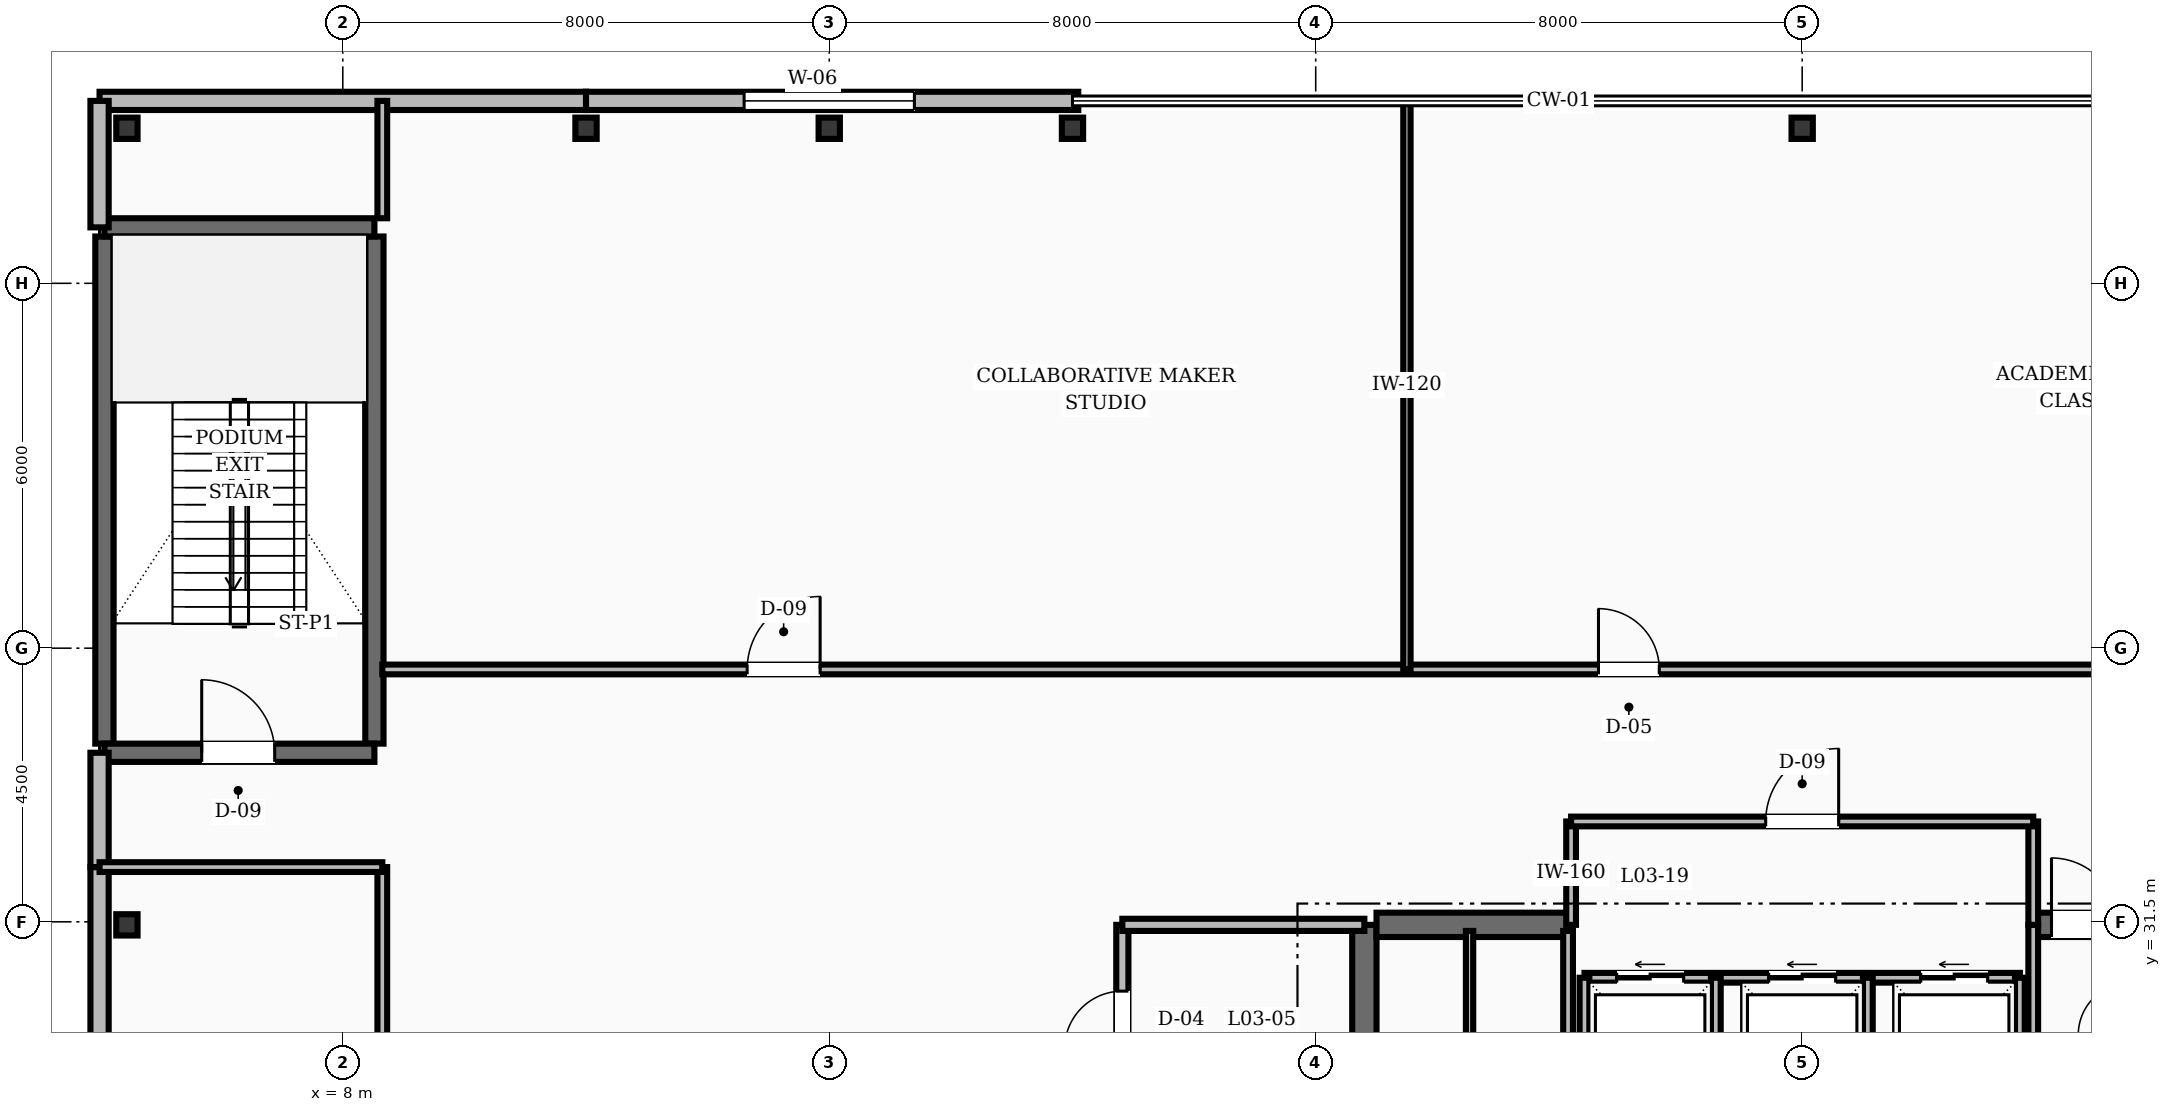
"""IFC4 building model, lengths in metres.
Left out: names, types, materials, properties, quantities, classifications, styles, units other than length and angle.
Written with IfcOpenShell. Run it as: python <this file> out.ifc"""

import sys

from ifc_helpers import new_model, si_unit, direction, frame, frame_2d, origin, origin_2d, place, context, subcontext, project, spatial, rectangle, hollow_rectangle, i_section, extrude, element, fill, save


model = new_model("IFC4")
c1 = context("Model", 3, precision=1e-05, world=origin(), true_north=direction((0.0, 1.0)))
c2 = subcontext(c1, "Body", "Model", "MODEL_VIEW")
j1 = project(units=[si_unit("LENGTHUNIT", "METRE"), si_unit("PLANEANGLEUNIT", "RADIAN")], contexts=[c1])
p1 = place(None, origin())
s1 = spatial("IfcSite", under=j1, at=p1, CompositionType="ELEMENT")
p2 = place(p1, origin())
s2 = spatial("IfcBuilding", under=s1, at=p2, CompositionType="ELEMENT")
p3 = place(p2, frame((0.0, 0.0, 14.8)))
s3 = spatial("IfcBuildingStorey", under=s2, at=p3, CompositionType="ELEMENT", Elevation=14.8)
p4 = place(p3, frame((24.8, 25.15, 0.0), z_axis=(0.0, 0.0, 1.0), x_axis=(0.0, 1.0, 0.0)))
e1 = element("IfcWall", 1, at=p4, inside=s3, PredefinedType="SHEAR", context=c2, shape_type="SweptSolid", body=[
    extrude(rectangle(XDim=6.3, YDim=0.4, at=frame_2d((3.15, 0.0))), origin(), (0.0, 0.0, 1.0), 4.8),
])
p5 = place(p3, frame((25.0, 31.45, 0.0), z_axis=(0.0, 0.0, 1.0), x_axis=(1.0, 0.0, 0.0)))
e2 = element("IfcWall", 2, at=p5, inside=s3, PredefinedType="SHEAR", context=c2, shape_type="SweptSolid", body=[
    extrude(rectangle(XDim=3.2, YDim=0.4, at=frame_2d((1.6, 0.0))), origin(), (0.0, 0.0, 1.0), 4.8),
])
p6 = place(p3, frame((35.8, 31.45, 0.0), z_axis=(0.0, 0.0, 1.0), x_axis=(1.0, 0.0, 0.0)))
e3 = element("IfcWall", 3, at=p6, inside=s3, PredefinedType="SHEAR", context=c2, shape_type="SweptSolid", body=[
    extrude(rectangle(XDim=3.2, YDim=0.4, at=frame_2d((1.6, 0.0))), origin(), (0.0, 0.0, 1.0), 4.8),
])
p7 = place(p6, frame((0.3, 0.0, 0.0)))
e4 = element("IfcOpeningElement", 4, at=p7, cuts=e3, PredefinedType="OPENING", context=c2, shape_type="SweptSolid", body=[
    extrude(rectangle(XDim=1.1, YDim=2.1, at=frame_2d((0.55, 1.05))), frame((0.0, 0.21, 0.0), z_axis=(0.0, -1.0, 0.0), x_axis=(1.0, 0.0, 0.0)), (0.0, 0.0, 1.0), 0.42),
])
for number, where, z_axis, x_axis in (
    (5, (4.08, 34.43, 0.0), (0.0, 0.0, 1.0), (0.0, 1.0, 0.0)),
    (6, (8.52, 34.43, 0.0), (0.0, 0.0, 1.0), (0.0, 1.0, 0.0)),
):
    element("IfcWall", number, at=place(p3, frame(where, z_axis=z_axis, x_axis=x_axis)), inside=s3, PredefinedType="SHEAR", context=c2, shape_type="SweptSolid", body=[
        extrude(rectangle(XDim=8.34, YDim=0.3, at=frame_2d((4.17, 0.0))), origin(), (0.0, 0.0, 1.0), 4.8),
    ])
p8 = place(p3, frame((4.08, 34.28, 0.0), z_axis=(0.0, 0.0, 1.0), x_axis=(1.0, 0.0, 0.0)))
e7 = element("IfcWall", 7, at=p8, inside=s3, PredefinedType="SHEAR", context=c2, shape_type="SweptSolid", body=[
    extrude(rectangle(XDim=4.44, YDim=0.3, at=frame_2d((2.22, 0.0))), origin(), (0.0, 0.0, 1.0), 4.8),
])
p9 = place(p8, frame((1.6, 0.0, 0.0)))
e8 = element("IfcOpeningElement", 8, at=p9, cuts=e7, PredefinedType="OPENING", context=c2, shape_type="SweptSolid", body=[
    extrude(rectangle(XDim=1.2, YDim=2.1, at=frame_2d((0.6, 1.05))), frame((0.0, 0.16, 0.0), z_axis=(0.0, -1.0, 0.0), x_axis=(1.0, 0.0, 0.0)), (0.0, 0.0, 1.0), 0.32),
])
p10 = place(p3, frame((4.08, 42.92, 0.0), z_axis=(0.0, 0.0, 1.0), x_axis=(1.0, 0.0, 0.0)))
e9 = element("IfcWall", 9, at=p10, inside=s3, PredefinedType="SHEAR", context=c2, shape_type="SweptSolid", body=[
    extrude(rectangle(XDim=4.44, YDim=0.3, at=frame_2d((2.22, 0.0))), origin(), (0.0, 0.0, 1.0), 4.8),
])
for number, where, z_axis, x_axis in (
    (10, (4.45, 44.55, 0.0), (0.0, 0.0, 1.0), (1.0, 0.0, 0.0)),
    (11, (12.0, 44.55, 0.0), (0.0, 0.0, 1.0), (1.0, 0.0, 0.0)),
    (12, (20.0, 44.55, 0.0), (0.0, 0.0, 1.0), (1.0, 0.0, 0.0)),
    (13, (32.0, 44.55, 0.0), (0.0, 0.0, 1.0), (1.0, 0.0, 0.0)),
    (14, (4.45, 31.45, 0.0), (0.0, 0.0, 1.0), (1.0, 0.0, 0.0)),
):
    element("IfcColumn", number, at=place(p3, frame(where, z_axis=z_axis, x_axis=x_axis)), inside=s3, PredefinedType="COLUMN", context=c2, shape_type="SweptSolid", body=[
        extrude(i_section(OverallWidth=0.35, OverallDepth=0.35, WebThickness=0.012, FlangeThickness=0.019, FilletRadius=0.016, at=origin_2d()), origin(), (0.0, 0.0, 1.0), 4.8),
    ])
p11 = place(p3, frame((16.0, 44.55, 0.0), z_axis=(0.0, 0.0, 1.0), x_axis=(1.0, 0.0, 0.0)))
e15 = element("IfcColumn", 15, at=p11, inside=s3, PredefinedType="PILASTER", context=c2, shape_type="SweptSolid", body=[
    extrude(hollow_rectangle(XDim=0.35, YDim=0.35, WallThickness=0.016, at=origin_2d()), origin(), (0.0, 0.0, 1.0), 4.8),
])
p12 = place(p3, frame((12.0, 45.0, 0.0), z_axis=(0.0, 0.0, 1.0), x_axis=(-1.0, 0.0, 0.0)))
e16 = element("IfcWall", 16, at=p12, inside=s3, PredefinedType="STANDARD", context=c2, shape_type="SweptSolid", body=[
    extrude(rectangle(XDim=8.0, YDim=0.3, at=frame_2d((4.0, 0.0))), origin(), (0.0, 0.0, 1.0), 3.57),
])
p13 = place(p3, frame((20.095, 45.0, 0.0), z_axis=(0.0, 0.0, 1.0), x_axis=(-1.0, 0.0, 0.0)))
e17 = element("IfcWall", 17, at=p13, inside=s3, PredefinedType="STANDARD", context=c2, shape_type="SweptSolid", body=[
    extrude(rectangle(XDim=8.095, YDim=0.3, at=frame_2d((4.047, 0.0))), origin(), (0.0, 0.0, 1.0), 3.57),
])
p14 = place(p13, frame((2.695, 0.0, 0.85)))
e18 = element("IfcOpeningElement", 18, at=p14, cuts=e17, PredefinedType="OPENING", context=c2, shape_type="SweptSolid", body=[
    extrude(rectangle(XDim=2.8, YDim=2.3, at=frame_2d((1.4, 1.15))), frame((0.0, 0.16, 0.0), z_axis=(0.0, -1.0, 0.0), x_axis=(1.0, 0.0, 0.0)), (0.0, 0.0, 1.0), 0.32),
])
p15 = place(p3, frame((4.0, 32.4, 0.0), z_axis=(0.0, 0.0, 1.0), x_axis=(0.0, -1.0, 0.0)))
e19 = element("IfcWall", 19, at=p15, inside=s3, PredefinedType="STANDARD", context=c2, shape_type="SweptSolid", body=[
    extrude(rectangle(XDim=10.4, YDim=0.3, at=frame_2d((5.2, 0.0))), origin(), (0.0, 0.0, 1.0), 3.57),
])
p16 = place(p15, frame((3.8, 0.0, 0.85)))
e20 = element("IfcOpeningElement", 20, at=p16, cuts=e19, PredefinedType="OPENING", context=c2, shape_type="SweptSolid", body=[
    extrude(rectangle(XDim=2.8, YDim=2.3, at=frame_2d((1.4, 1.15))), frame((0.0, 0.16, 0.0), z_axis=(0.0, -1.0, 0.0), x_axis=(1.0, 0.0, 0.0)), (0.0, 0.0, 1.0), 0.32),
])
p17 = place(p3, frame((4.0, 34.28, 0.0), z_axis=(0.0, 0.0, 1.0), x_axis=(0.0, -1.0, 0.0)))
e21 = element("IfcWall", 21, at=p17, inside=s3, PredefinedType="STANDARD", context=c2, shape_type="SweptSolid", body=[
    extrude(rectangle(XDim=1.88, YDim=0.3, at=frame_2d((0.94, 0.0))), origin(), (0.0, 0.0, 1.0), 3.57),
])
p18 = place(p3, frame((4.0, 45.0, 0.0), z_axis=(0.0, 0.0, 1.0), x_axis=(0.0, -1.0, 0.0)))
e22 = element("IfcWall", 22, at=p18, inside=s3, PredefinedType="STANDARD", context=c2, shape_type="SweptSolid", body=[
    extrude(rectangle(XDim=2.08, YDim=0.3, at=frame_2d((1.04, 0.0))), origin(), (0.0, 0.0, 1.0), 3.57),
])
p19 = place(p3, frame((20.82, 28.32, 0.0), z_axis=(0.0, 0.0, 1.0), x_axis=(0.0, 1.0, 0.0)))
e23 = element("IfcWall", 23, at=p19, inside=s3, PredefinedType="SOLIDWALL", context=c2, shape_type="SweptSolid", body=[
    extrude(rectangle(XDim=3.13, YDim=0.2, at=frame_2d((1.565, 0.0))), origin(), (0.0, 0.0, 1.0), 3.52),
])
p20 = place(p19, frame((1.09, 0.0, 0.0)))
e24 = element("IfcOpeningElement", 24, at=p20, cuts=e23, PredefinedType="OPENING", context=c2, shape_type="SweptSolid", body=[
    extrude(rectangle(XDim=0.95, YDim=2.1, at=frame_2d((0.475, 1.05))), frame((0.0, 0.11, 0.0), z_axis=(0.0, -1.0, 0.0), x_axis=(1.0, 0.0, 0.0)), (0.0, 0.0, 1.0), 0.22),
])
p21 = place(p3, frame((20.82, 31.45, 0.0), z_axis=(0.0, 0.0, 1.0), x_axis=(1.0, 0.0, 0.0)))
e25 = element("IfcWall", 25, at=p21, inside=s3, PredefinedType="SOLIDWALL", context=c2, shape_type="SweptSolid", body=[
    extrude(rectangle(XDim=3.98, YDim=0.2, at=frame_2d((1.99, 0.0))), origin(), (0.0, 0.0, 1.0), 3.52),
])
p22 = place(p3, frame((35.8, 25.25, 0.0), z_axis=(0.0, 0.0, 1.0), x_axis=(0.0, 1.0, 0.0)))
e26 = element("IfcWall", 26, at=p22, inside=s3, PredefinedType="SOLIDWALL", context=c2, shape_type="SweptSolid", body=[
    extrude(rectangle(XDim=6.2, YDim=0.16, at=frame_2d((3.1, 0.0))), origin(), (0.0, 0.0, 1.0), 3.52),
])
p23 = place(p3, frame((28.42, 30.58, 0.0), z_axis=(0.0, 0.0, 1.0), x_axis=(1.0, 0.0, 0.0)))
e27 = element("IfcWall", 27, at=p23, inside=s3, PredefinedType="SOLIDWALL", context=c2, shape_type="SweptSolid", body=[
    extrude(rectangle(XDim=7.16, YDim=0.16, at=frame_2d((3.58, 0.0))), origin(), (0.0, 0.0, 1.0), 3.52),
])
p24 = place(p23, frame((0.53, 0.0, 0.0)))
e28 = element("IfcOpeningElement", 28, at=p24, cuts=e27, PredefinedType="OPENING", context=c2, shape_type="SweptSolid", body=[
    extrude(rectangle(XDim=1.1, YDim=2.15, at=frame_2d((0.55, 1.075))), frame((0.0, 0.09, 0.0), z_axis=(0.0, -1.0, 0.0), x_axis=(1.0, 0.0, 0.0)), (0.0, 0.0, 1.0), 0.18),
])
p25 = place(p23, frame((3.03, 0.0, 0.0)))
e29 = element("IfcOpeningElement", 29, at=p25, cuts=e27, PredefinedType="OPENING", context=c2, shape_type="SweptSolid", body=[
    extrude(rectangle(XDim=1.1, YDim=2.15, at=frame_2d((0.55, 1.075))), frame((0.0, 0.09, 0.0), z_axis=(0.0, -1.0, 0.0), x_axis=(1.0, 0.0, 0.0)), (0.0, 0.0, 1.0), 0.18),
])
p26 = place(p23, frame((5.53, 0.0, 0.0)))
e30 = element("IfcOpeningElement", 30, at=p26, cuts=e27, PredefinedType="OPENING", context=c2, shape_type="SweptSolid", body=[
    extrude(rectangle(XDim=1.1, YDim=2.15, at=frame_2d((0.55, 1.075))), frame((0.0, 0.09, 0.0), z_axis=(0.0, -1.0, 0.0), x_axis=(1.0, 0.0, 0.0)), (0.0, 0.0, 1.0), 0.18),
])
for number, where, z_axis, x_axis in (
    (31, (28.42, 28.42, 0.0), (0.0, 0.0, 1.0), (0.0, 1.0, 0.0)),
    (32, (30.58, 28.42, 0.0), (0.0, 0.0, 1.0), (0.0, 1.0, 0.0)),
    (33, (33.08, 28.42, 0.0), (0.0, 0.0, 1.0), (0.0, 1.0, 0.0)),
    (34, (35.58, 28.42, 0.0), (0.0, 0.0, 1.0), (0.0, 1.0, 0.0)),
):
    element("IfcWall", number, at=place(p3, frame(where, z_axis=z_axis, x_axis=x_axis)), inside=s3, PredefinedType="SOLIDWALL", context=c2, shape_type="SweptSolid", body=[
        extrude(rectangle(XDim=2.16, YDim=0.16, at=frame_2d((1.08, 0.0))), origin(), (0.0, 0.0, 1.0), 3.52),
    ])
for number, where, z_axis, x_axis in (
    (35, (28.2, 31.45, 0.0), (0.0, 0.0, 1.0), (0.0, 1.0, 0.0)),
    (36, (35.8, 31.45, 0.0), (0.0, 0.0, 1.0), (0.0, 1.0, 0.0)),
):
    element("IfcWall", number, at=place(p3, frame(where, z_axis=z_axis, x_axis=x_axis)), inside=s3, PredefinedType="SOLIDWALL", context=c2, shape_type="SweptSolid", body=[
        extrude(rectangle(XDim=1.7, YDim=0.16, at=frame_2d((0.85, 0.0))), origin(), (0.0, 0.0, 1.0), 3.52),
    ])
p27 = place(p3, frame((28.2, 33.15, 0.0), z_axis=(0.0, 0.0, 1.0), x_axis=(1.0, 0.0, 0.0)))
e37 = element("IfcWall", 37, at=p27, inside=s3, PredefinedType="SOLIDWALL", context=c2, shape_type="SweptSolid", body=[
    extrude(rectangle(XDim=7.6, YDim=0.16, at=frame_2d((3.8, 0.0))), origin(), (0.0, 0.0, 1.0), 3.52),
])
p28 = place(p27, frame((3.2, 0.0, 0.0)))
e38 = element("IfcOpeningElement", 38, at=p28, cuts=e37, PredefinedType="OPENING", context=c2, shape_type="SweptSolid", body=[
    extrude(rectangle(XDim=1.2, YDim=2.1, at=frame_2d((0.6, 1.05))), frame((0.0, 0.09, 0.0), z_axis=(0.0, -1.0, 0.0), x_axis=(1.0, 0.0, 0.0)), (0.0, 0.0, 1.0), 0.18),
])
p29 = place(p3, frame((28.15, 25.25, 0.0), z_axis=(0.0, 0.0, 1.0), x_axis=(0.0, 1.0, 0.0)))
e39 = element("IfcWall", 39, at=p29, inside=s3, PredefinedType="SOLIDWALL", context=c2, shape_type="SweptSolid", body=[
    extrude(rectangle(XDim=6.1, YDim=0.16, at=frame_2d((3.05, 0.0))), origin(), (0.0, 0.0, 1.0), 3.52),
])
p30 = place(p3, frame((26.53, 25.25, 0.0), z_axis=(0.0, 0.0, 1.0), x_axis=(0.0, 1.0, 0.0)))
e40 = element("IfcWall", 40, at=p30, inside=s3, PredefinedType="PARTITIONING", context=c2, shape_type="SweptSolid", body=[
    extrude(rectangle(XDim=6.1, YDim=0.12, at=frame_2d((3.05, 0.0))), origin(), (0.0, 0.0, 1.0), 3.52),
])
p31 = place(p3, frame((8.65, 35.65, 0.0), z_axis=(0.0, 0.0, 1.0), x_axis=(1.0, 0.0, 0.0)))
e41 = element("IfcWall", 41, at=p31, inside=s3, PredefinedType="SOLIDWALL", context=c2, shape_type="SweptSolid", body=[
    extrude(rectangle(XDim=46.7, YDim=0.16, at=frame_2d((23.35, 0.0))), origin(), (0.0, 0.0, 1.0), 3.52),
])
p32 = place(p31, frame((6.0, 0.0, 0.0)))
e42 = element("IfcOpeningElement", 42, at=p32, cuts=e41, PredefinedType="OPENING", context=c2, shape_type="SweptSolid", body=[
    extrude(rectangle(XDim=1.2, YDim=2.1, at=frame_2d((0.6, 1.05))), frame((0.0, 0.09, 0.0), z_axis=(0.0, -1.0, 0.0), x_axis=(1.0, 0.0, 0.0)), (0.0, 0.0, 1.0), 0.18),
])
p33 = place(p31, frame((20.0, 0.0, 0.0)))
e43 = element("IfcOpeningElement", 43, at=p33, cuts=e41, PredefinedType="OPENING", context=c2, shape_type="SweptSolid", body=[
    extrude(rectangle(XDim=1.0, YDim=2.1, at=frame_2d((0.5, 1.05))), frame((0.0, 0.09, 0.0), z_axis=(0.0, -1.0, 0.0), x_axis=(1.0, 0.0, 0.0)), (0.0, 0.0, 1.0), 0.18),
])
p34 = place(p31, frame((41.5, 0.0, 0.0)))
e44 = element("IfcOpeningElement", 44, at=p34, cuts=e41, PredefinedType="OPENING", context=c2, shape_type="SweptSolid", body=[
    extrude(rectangle(XDim=0.95, YDim=2.1, at=frame_2d((0.475, 1.05))), frame((0.0, 0.09, 0.0), z_axis=(0.0, -1.0, 0.0), x_axis=(1.0, 0.0, 0.0)), (0.0, 0.0, 1.0), 0.18),
])
p35 = place(p3, frame((8.65, 12.15, 0.0), z_axis=(0.0, 0.0, 1.0), x_axis=(0.0, 1.0, 0.0)))
e45 = element("IfcWall", 45, at=p35, inside=s3, PredefinedType="SOLIDWALL", context=c2, shape_type="SweptSolid", body=[
    extrude(rectangle(XDim=20.25, YDim=0.16, at=frame_2d((10.125, 0.0))), origin(), (0.0, 0.0, 1.0), 3.52),
])
p36 = place(p35, frame((8.0, 0.0, 0.0)))
e46 = element("IfcOpeningElement", 46, at=p36, cuts=e45, PredefinedType="OPENING", context=c2, shape_type="SweptSolid", body=[
    extrude(rectangle(XDim=1.0, YDim=2.1, at=frame_2d((0.5, 1.05))), frame((0.0, 0.09, 0.0), z_axis=(0.0, -1.0, 0.0), x_axis=(1.0, 0.0, 0.0)), (0.0, 0.0, 1.0), 0.18),
])
p37 = place(p3, frame((4.0, 32.4, 0.0), z_axis=(0.0, 0.0, 1.0), x_axis=(1.0, 0.0, 0.0)))
e47 = element("IfcWall", 47, at=p37, inside=s3, PredefinedType="SOLIDWALL", context=c2, shape_type="SweptSolid", body=[
    extrude(rectangle(XDim=4.65, YDim=0.16, at=frame_2d((2.325, 0.0))), origin(), (0.0, 0.0, 1.0), 3.52),
])
p38 = place(p3, frame((8.65, 43.07, 0.0), z_axis=(0.0, 0.0, 1.0), x_axis=(0.0, 1.0, 0.0)))
e48 = element("IfcWall", 48, at=p38, inside=s3, PredefinedType="SOLIDWALL", context=c2, shape_type="SweptSolid", body=[
    extrude(rectangle(XDim=1.93, YDim=0.16, at=frame_2d((0.965, 0.0))), origin(), (0.0, 0.0, 1.0), 3.52),
])
p39 = place(p3, frame((25.5, 35.65, 0.0), z_axis=(0.0, 0.0, 1.0), x_axis=(0.0, 1.0, 0.0)))
e49 = element("IfcWall", 49, at=p39, inside=s3, PredefinedType="PARTITIONING", context=c2, shape_type="SweptSolid", body=[
    extrude(rectangle(XDim=9.35, YDim=0.12, at=frame_2d((4.675, 0.0))), origin(), (0.0, 0.0, 1.0), 3.52),
])
p40 = place(p14, origin())
e50 = element("IfcWindow", 50, at=p40, inside=s3, PartitioningType="SINGLE_PANEL", PredefinedType="WINDOW", context=c2, shape_type="SweptSolid", body=[
    extrude(rectangle(XDim=2.8, YDim=2.3, at=frame_2d((1.4, 1.15))), frame((0.0, 0.03, 0.0), z_axis=(0.0, -1.0, 0.0), x_axis=(1.0, 0.0, 0.0)), (0.0, 0.0, 1.0), 0.06),
])
fill(e18, e50)
p41 = place(p20, origin())
e51 = element("IfcDoor", 51, at=p41, inside=s3, OperationType="SINGLE_SWING_LEFT", PredefinedType="DOOR", context=c2, shape_type="SweptSolid", body=[
    extrude(rectangle(XDim=0.95, YDim=2.1, at=frame_2d((0.475, 1.05))), frame((0.0, 0.025, 0.0), z_axis=(0.0, -1.0, 0.0), x_axis=(1.0, 0.0, 0.0)), (0.0, 0.0, 1.0), 0.05),
])
fill(e24, e51)
p42 = place(p9, origin())
e52 = element("IfcDoor", 52, at=p42, inside=s3, OperationType="SINGLE_SWING_LEFT", PredefinedType="DOOR", context=c2, shape_type="SweptSolid", body=[
    extrude(rectangle(XDim=1.2, YDim=2.1, at=frame_2d((0.6, 1.05))), frame((0.0, 0.025, 0.0), z_axis=(0.0, -1.0, 0.0), x_axis=(1.0, 0.0, 0.0)), (0.0, 0.0, 1.0), 0.05),
])
fill(e8, e52)
p43 = place(p7, origin())
e53 = element("IfcDoor", 53, at=p43, inside=s3, OperationType="SINGLE_SWING_LEFT", PredefinedType="DOOR", context=c2, shape_type="SweptSolid", body=[
    extrude(rectangle(XDim=1.1, YDim=2.1, at=frame_2d((0.55, 1.05))), frame((0.0, 0.025, 0.0), z_axis=(0.0, -1.0, 0.0), x_axis=(1.0, 0.0, 0.0)), (0.0, 0.0, 1.0), 0.05),
])
fill(e4, e53)
p44 = place(p24, origin())
e54 = element("IfcDoor", 54, at=p44, inside=s3, OperationType="SLIDING_TO_LEFT", PredefinedType="DOOR", context=c2, shape_type="SweptSolid", body=[
    extrude(rectangle(XDim=1.1, YDim=2.15, at=frame_2d((0.55, 1.075))), frame((0.0, 0.025, 0.0), z_axis=(0.0, -1.0, 0.0), x_axis=(1.0, 0.0, 0.0)), (0.0, 0.0, 1.0), 0.05),
])
fill(e28, e54)
p45 = place(p25, origin())
e55 = element("IfcDoor", 55, at=p45, inside=s3, OperationType="SLIDING_TO_LEFT", PredefinedType="DOOR", context=c2, shape_type="SweptSolid", body=[
    extrude(rectangle(XDim=1.1, YDim=2.15, at=frame_2d((0.55, 1.075))), frame((0.0, 0.025, 0.0), z_axis=(0.0, -1.0, 0.0), x_axis=(1.0, 0.0, 0.0)), (0.0, 0.0, 1.0), 0.05),
])
fill(e29, e55)
p46 = place(p26, origin())
e56 = element("IfcDoor", 56, at=p46, inside=s3, OperationType="SLIDING_TO_LEFT", PredefinedType="DOOR", context=c2, shape_type="SweptSolid", body=[
    extrude(rectangle(XDim=1.1, YDim=2.15, at=frame_2d((0.55, 1.075))), frame((0.0, 0.025, 0.0), z_axis=(0.0, -1.0, 0.0), x_axis=(1.0, 0.0, 0.0)), (0.0, 0.0, 1.0), 0.05),
])
fill(e30, e56)
p47 = place(p28, origin())
e57 = element("IfcDoor", 57, at=p47, inside=s3, OperationType="SINGLE_SWING_RIGHT", PredefinedType="DOOR", context=c2, shape_type="SweptSolid", body=[
    extrude(rectangle(XDim=1.2, YDim=2.1, at=frame_2d((0.6, 1.05))), frame((0.0, 0.025, 0.0), z_axis=(0.0, -1.0, 0.0), x_axis=(1.0, 0.0, 0.0)), (0.0, 0.0, 1.0), 0.05),
])
fill(e38, e57)
p48 = place(p32, origin())
e58 = element("IfcDoor", 58, at=p48, inside=s3, OperationType="SINGLE_SWING_RIGHT", PredefinedType="DOOR", context=c2, shape_type="SweptSolid", body=[
    extrude(rectangle(XDim=1.2, YDim=2.1, at=frame_2d((0.6, 1.05))), frame((0.0, 0.025, 0.0), z_axis=(0.0, -1.0, 0.0), x_axis=(1.0, 0.0, 0.0)), (0.0, 0.0, 1.0), 0.05),
])
fill(e42, e58)
p49 = place(p33, origin())
e59 = element("IfcDoor", 59, at=p49, inside=s3, OperationType="SINGLE_SWING_LEFT", PredefinedType="DOOR", context=c2, shape_type="SweptSolid", body=[
    extrude(rectangle(XDim=1.0, YDim=2.1, at=frame_2d((0.5, 1.05))), frame((0.0, 0.025, 0.0), z_axis=(0.0, -1.0, 0.0), x_axis=(1.0, 0.0, 0.0)), (0.0, 0.0, 1.0), 0.05),
])
fill(e43, e59)
save(model, sys.argv[1])
